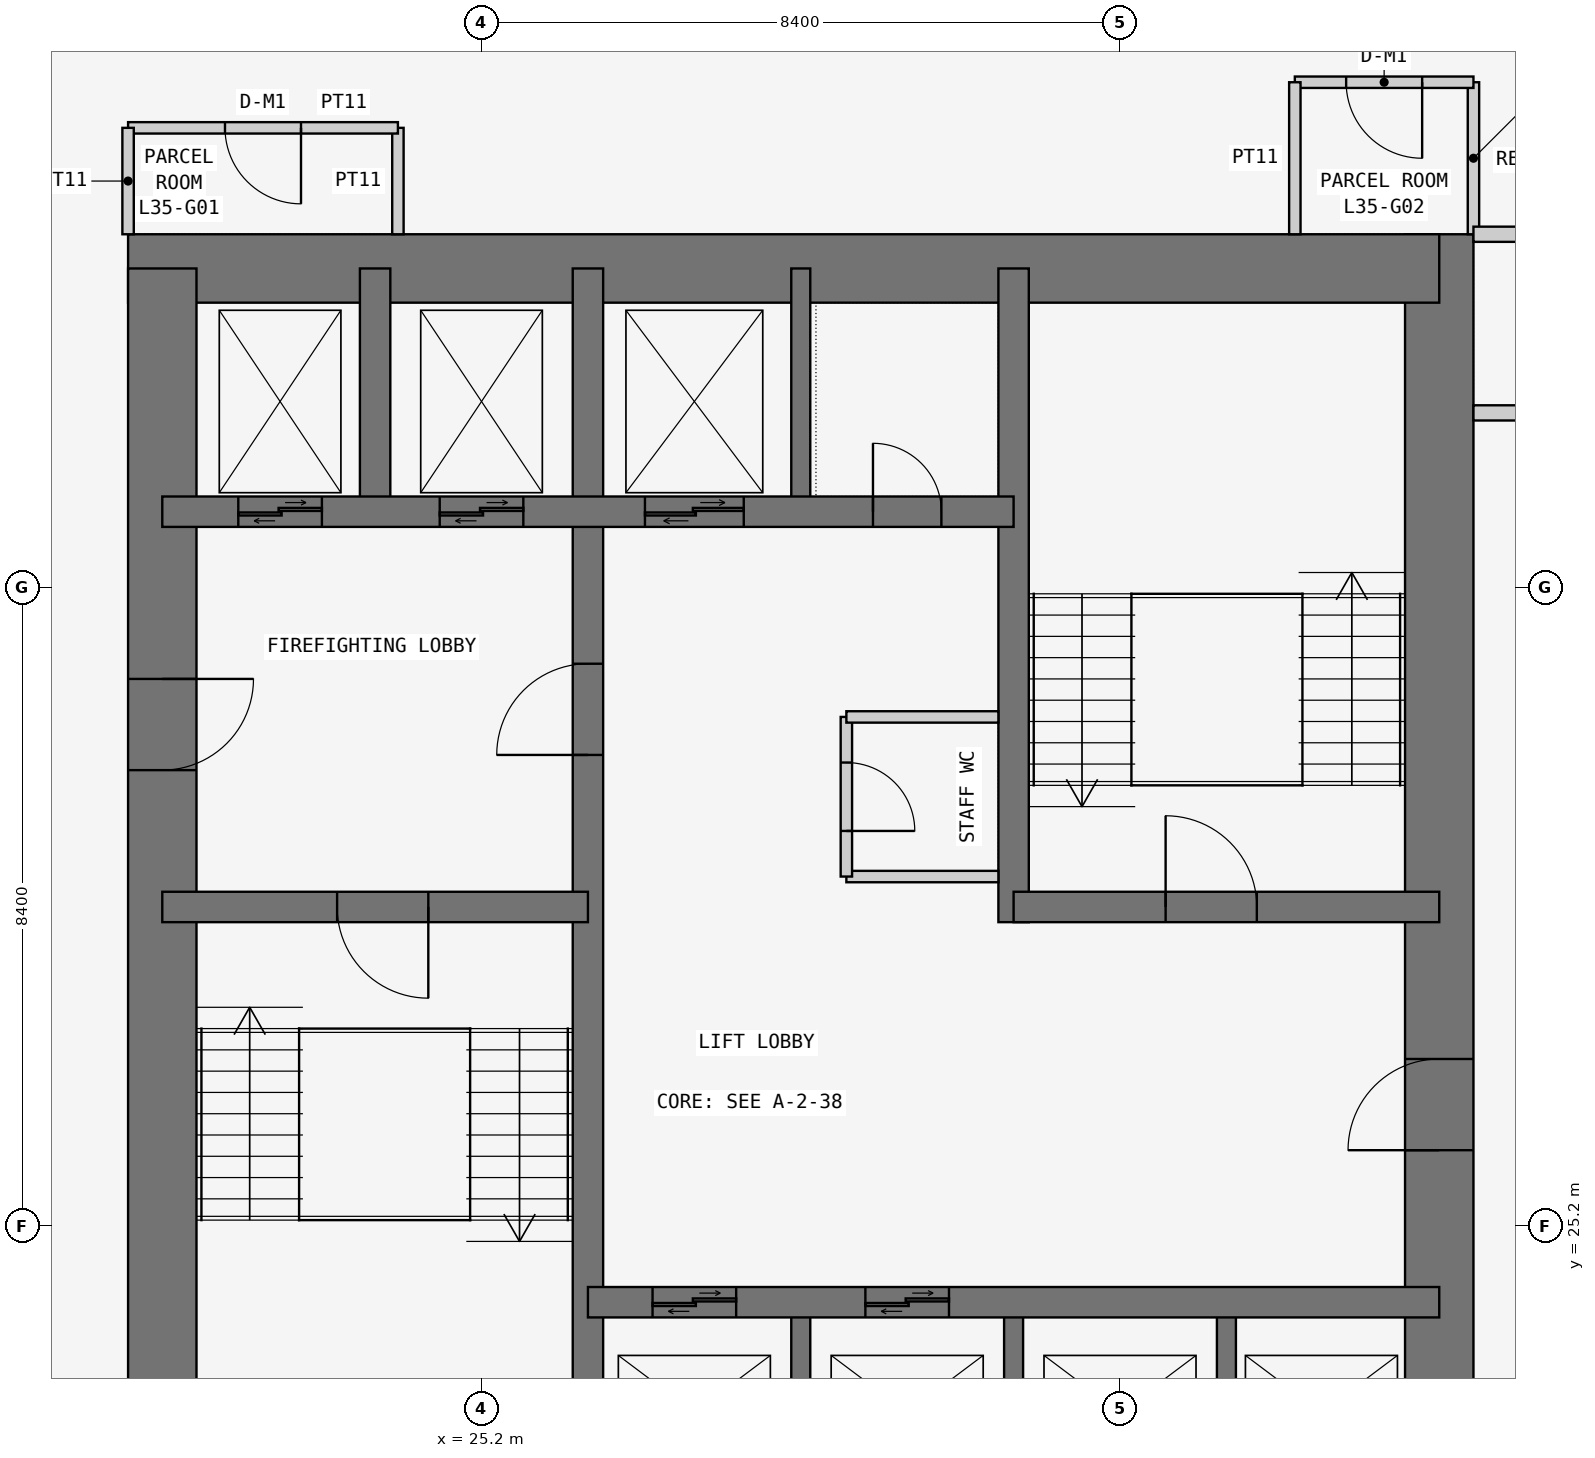
"""IFC4 building model, lengths in metres.
Left out: names, types, materials, properties, quantities, classifications, styles, units other than length and angle.
Written with IfcOpenShell. Run it as: python <this file> out.ifc"""

import sys

from ifc_helpers import new_model, si_unit, direction, frame, frame_2d, origin, place, context, subcontext, project, spatial, rectangle, extrude, element, fill, save


model = new_model("IFC4")
c1 = context("Model", 3, precision=1e-05, world=origin(), true_north=direction((0.0, 1.0)))
c2 = subcontext(c1, "Body", "Model", "MODEL_VIEW")
j1 = project(units=[si_unit("LENGTHUNIT", "METRE"), si_unit("PLANEANGLEUNIT", "RADIAN")], contexts=[c1])
p1 = place(None, origin())
s1 = spatial("IfcSite", under=j1, at=p1, CompositionType="ELEMENT")
p2 = place(p1, origin())
s2 = spatial("IfcBuilding", under=s1, at=p2, CompositionType="ELEMENT")
p3 = place(p2, frame((0.0, 0.0, 137.7)))
s3 = spatial("IfcBuildingStorey", under=s2, at=p3, CompositionType="ELEMENT", Elevation=137.7)
p4 = place(p3, frame((37.8, 21.0, 0.0), z_axis=(0.0, 0.0, 1.0), x_axis=(0.0, 1.0, 0.0)))
e1 = element("IfcWall", 1, at=p4, inside=s3, PredefinedType="SHEAR", context=c2, shape_type="SweptSolid", body=[
    extrude(rectangle(XDim=17.25, YDim=0.9, at=frame_2d((8.625, 0.0))), origin(), (0.0, 0.0, 1.0), 3.6),
])
p5 = place(p4, frame((5.2, 0.0, 0.0)))
e2 = element("IfcOpeningElement", 2, at=p5, cuts=e1, PredefinedType="OPENING", context=c2, shape_type="SweptSolid", body=[
    extrude(rectangle(XDim=1.2, YDim=2.1, at=frame_2d((0.6, 1.05))), frame((0.0, 0.46, 0.0), z_axis=(0.0, -1.0, 0.0), x_axis=(1.0, 0.0, 0.0)), (0.0, 0.0, 1.0), 0.92),
])
p6 = place(p3, frame((37.8, 37.8, 0.0), z_axis=(0.0, 0.0, 1.0), x_axis=(-1.0, 0.0, 0.0)))
e3 = element("IfcWall", 3, at=p6, inside=s3, PredefinedType="SHEAR", context=c2, shape_type="SweptSolid", body=[
    extrude(rectangle(XDim=17.25, YDim=0.9, at=frame_2d((8.625, 0.0))), origin(), (0.0, 0.0, 1.0), 3.6),
])
p7 = place(p3, frame((21.0, 37.8, 0.0), z_axis=(0.0, 0.0, 1.0), x_axis=(0.0, -1.0, 0.0)))
e4 = element("IfcWall", 4, at=p7, inside=s3, PredefinedType="SHEAR", context=c2, shape_type="SweptSolid", body=[
    extrude(rectangle(XDim=17.25, YDim=0.9, at=frame_2d((8.625, 0.0))), origin(), (0.0, 0.0, 1.0), 3.6),
])
p8 = place(p7, frame((5.4, 0.0, 0.0)))
e5 = element("IfcOpeningElement", 5, at=p8, cuts=e4, PredefinedType="OPENING", context=c2, shape_type="SweptSolid", body=[
    extrude(rectangle(XDim=1.2, YDim=2.1, at=frame_2d((0.6, 1.05))), frame((0.0, 0.46, 0.0), z_axis=(0.0, -1.0, 0.0), x_axis=(1.0, 0.0, 0.0)), (0.0, 0.0, 1.0), 0.92),
])
p9 = place(p3, frame((26.6, 21.0, 0.0), z_axis=(0.0, 0.0, 1.0), x_axis=(0.0, 1.0, 0.0)))
e6 = element("IfcWall", 6, at=p9, inside=s3, PredefinedType="SHEAR", context=c2, shape_type="SweptSolid", body=[
    extrude(rectangle(XDim=16.8, YDim=0.4, at=frame_2d((8.4, 0.0))), origin(), (0.0, 0.0, 1.0), 3.6),
])
p10 = place(p9, frame((10.4, 0.0, 0.0)))
e7 = element("IfcOpeningElement", 7, at=p10, cuts=e6, PredefinedType="OPENING", context=c2, shape_type="SweptSolid", body=[
    extrude(rectangle(XDim=1.2, YDim=2.1, at=frame_2d((0.6, 1.05))), frame((0.0, 0.21, 0.0), z_axis=(0.0, -1.0, 0.0), x_axis=(1.0, 0.0, 0.0)), (0.0, 0.0, 1.0), 0.42),
])
p11 = place(p3, frame((21.0, 29.4, 0.0), z_axis=(0.0, 0.0, 1.0), x_axis=(1.0, 0.0, 0.0)))
e8 = element("IfcWall", 8, at=p11, inside=s3, PredefinedType="SHEAR", context=c2, shape_type="SweptSolid", body=[
    extrude(rectangle(XDim=5.6, YDim=0.4, at=frame_2d((2.8, 0.0))), origin(), (0.0, 0.0, 1.0), 3.6),
])
p12 = place(p11, frame((2.3, 0.0, 0.0)))
e9 = element("IfcOpeningElement", 9, at=p12, cuts=e8, PredefinedType="OPENING", context=c2, shape_type="SweptSolid", body=[
    extrude(rectangle(XDim=1.2, YDim=2.1, at=frame_2d((0.6, 1.05))), frame((0.0, 0.21, 0.0), z_axis=(0.0, -1.0, 0.0), x_axis=(1.0, 0.0, 0.0)), (0.0, 0.0, 1.0), 0.42),
])
p13 = place(p3, frame((21.0, 34.6, 0.0), z_axis=(0.0, 0.0, 1.0), x_axis=(1.0, 0.0, 0.0)))
e10 = element("IfcWall", 10, at=p13, inside=s3, PredefinedType="SHEAR", context=c2, shape_type="SweptSolid", body=[
    extrude(rectangle(XDim=11.2, YDim=0.4, at=frame_2d((5.6, 0.0))), origin(), (0.0, 0.0, 1.0), 3.6),
])
p14 = place(p13, frame((9.35, 0.0, 0.0)))
e11 = element("IfcOpeningElement", 11, at=p14, cuts=e10, PredefinedType="OPENING", context=c2, shape_type="SweptSolid", body=[
    extrude(rectangle(XDim=0.9, YDim=2.1, at=frame_2d((0.45, 1.05))), frame((0.0, 0.21, 0.0), z_axis=(0.0, -1.0, 0.0), x_axis=(1.0, 0.0, 0.0)), (0.0, 0.0, 1.0), 0.42),
])
p15 = place(p13, frame((1.0, 0.0, 0.0)))
e12 = element("IfcOpeningElement", 12, at=p15, cuts=e10, PredefinedType="OPENING", context=c2, shape_type="SweptSolid", body=[
    extrude(rectangle(XDim=1.1, YDim=2.1, at=frame_2d((0.55, 1.05))), frame((0.0, 0.21, 0.0), z_axis=(0.0, -1.0, 0.0), x_axis=(1.0, 0.0, 0.0)), (0.0, 0.0, 1.0), 0.42),
])
p16 = place(p13, frame((3.65, 0.0, 0.0)))
e13 = element("IfcOpeningElement", 13, at=p16, cuts=e10, PredefinedType="OPENING", context=c2, shape_type="SweptSolid", body=[
    extrude(rectangle(XDim=1.1, YDim=2.1, at=frame_2d((0.55, 1.05))), frame((0.0, 0.21, 0.0), z_axis=(0.0, -1.0, 0.0), x_axis=(1.0, 0.0, 0.0)), (0.0, 0.0, 1.0), 0.42),
])
p17 = place(p13, frame((6.35, 0.0, 0.0)))
e14 = element("IfcOpeningElement", 14, at=p17, cuts=e10, PredefinedType="OPENING", context=c2, shape_type="SweptSolid", body=[
    extrude(rectangle(XDim=1.3, YDim=2.1, at=frame_2d((0.65, 1.05))), frame((0.0, 0.21, 0.0), z_axis=(0.0, -1.0, 0.0), x_axis=(1.0, 0.0, 0.0)), (0.0, 0.0, 1.0), 0.42),
])
p18 = place(p3, frame((23.8, 34.6, 0.0), z_axis=(0.0, 0.0, 1.0), x_axis=(0.0, 1.0, 0.0)))
e15 = element("IfcWall", 15, at=p18, inside=s3, PredefinedType="SHEAR", context=c2, shape_type="SweptSolid", body=[
    extrude(rectangle(XDim=3.2, YDim=0.4, at=frame_2d((1.6, 0.0))), origin(), (0.0, 0.0, 1.0), 3.6),
])
p19 = place(p3, frame((26.6, 24.2, 0.0), z_axis=(0.0, 0.0, 1.0), x_axis=(1.0, 0.0, 0.0)))
e16 = element("IfcWall", 16, at=p19, inside=s3, PredefinedType="SHEAR", context=c2, shape_type="SweptSolid", body=[
    extrude(rectangle(XDim=11.2, YDim=0.4, at=frame_2d((5.6, 0.0))), origin(), (0.0, 0.0, 1.0), 3.6),
])
p20 = place(p19, frame((0.85, 0.0, 0.0)))
e17 = element("IfcOpeningElement", 17, at=p20, cuts=e16, PredefinedType="OPENING", context=c2, shape_type="SweptSolid", body=[
    extrude(rectangle(XDim=1.1, YDim=2.1, at=frame_2d((0.55, 1.05))), frame((0.0, 0.21, 0.0), z_axis=(0.0, -1.0, 0.0), x_axis=(1.0, 0.0, 0.0)), (0.0, 0.0, 1.0), 0.42),
])
p21 = place(p19, frame((3.65, 0.0, 0.0)))
e18 = element("IfcOpeningElement", 18, at=p21, cuts=e16, PredefinedType="OPENING", context=c2, shape_type="SweptSolid", body=[
    extrude(rectangle(XDim=1.1, YDim=2.1, at=frame_2d((0.55, 1.05))), frame((0.0, 0.21, 0.0), z_axis=(0.0, -1.0, 0.0), x_axis=(1.0, 0.0, 0.0)), (0.0, 0.0, 1.0), 0.42),
])
p22 = place(p3, frame((32.2, 29.2, 0.0), z_axis=(0.0, 0.0, 1.0), x_axis=(0.0, 1.0, 0.0)))
e19 = element("IfcWall", 19, at=p22, inside=s3, PredefinedType="SHEAR", context=c2, shape_type="SweptSolid", body=[
    extrude(rectangle(XDim=8.6, YDim=0.4, at=frame_2d((4.3, 0.0))), origin(), (0.0, 0.0, 1.0), 3.6),
])
p23 = place(p3, frame((32.2, 29.4, 0.0), z_axis=(0.0, 0.0, 1.0), x_axis=(1.0, 0.0, 0.0)))
e20 = element("IfcWall", 20, at=p23, inside=s3, PredefinedType="SHEAR", context=c2, shape_type="SweptSolid", body=[
    extrude(rectangle(XDim=5.6, YDim=0.4, at=frame_2d((2.8, 0.0))), origin(), (0.0, 0.0, 1.0), 3.6),
])
p24 = place(p23, frame((2.0, 0.0, 0.0)))
e21 = element("IfcOpeningElement", 21, at=p24, cuts=e20, PredefinedType="OPENING", context=c2, shape_type="SweptSolid", body=[
    extrude(rectangle(XDim=1.2, YDim=2.1, at=frame_2d((0.6, 1.05))), frame((0.0, 0.21, 0.0), z_axis=(0.0, -1.0, 0.0), x_axis=(1.0, 0.0, 0.0)), (0.0, 0.0, 1.0), 0.42),
])
for number, where, z_axis, x_axis in (
    (22, (29.4, 21.0, 0.0), (0.0, 0.0, 1.0), (0.0, 1.0, 0.0)),
    (23, (32.2, 21.0, 0.0), (0.0, 0.0, 1.0), (0.0, 1.0, 0.0)),
    (24, (35.0, 21.0, 0.0), (0.0, 0.0, 1.0), (0.0, 1.0, 0.0)),
    (25, (29.4, 34.6, 0.0), (0.0, 0.0, 1.0), (0.0, 1.0, 0.0)),
):
    element("IfcWall", number, at=place(p3, frame(where, z_axis=z_axis, x_axis=x_axis)), inside=s3, PredefinedType="SHEAR", context=c2, shape_type="SweptSolid", body=[
        extrude(rectangle(XDim=3.2, YDim=0.25, at=frame_2d((1.6, 0.0))), origin(), (0.0, 0.0, 1.0), 3.6),
    ])
p25 = place(p3, frame((24.1, 38.25, 0.0), z_axis=(0.0, 0.0, 1.0), x_axis=(0.0, 1.0, 0.0)))
e26 = element("IfcWall", 26, at=p25, inside=s3, PredefinedType="PARTITIONING", context=c2, shape_type="SweptSolid", body=[
    extrude(rectangle(XDim=1.4, YDim=0.15, at=frame_2d((0.7, 0.0))), origin(), (0.0, 0.0, 1.0), 3.45),
])
p26 = place(p3, frame((24.1, 39.65, 0.0), z_axis=(0.0, 0.0, 1.0), x_axis=(-1.0, 0.0, 0.0)))
e27 = element("IfcWall", 27, at=p26, inside=s3, PredefinedType="PARTITIONING", context=c2, shape_type="SweptSolid", body=[
    extrude(rectangle(XDim=3.55, YDim=0.15, at=frame_2d((1.775, 0.0))), origin(), (0.0, 0.0, 1.0), 3.45),
])
p27 = place(p26, frame((1.275, 0.0, 0.0)))
e28 = element("IfcOpeningElement", 28, at=p27, cuts=e27, PredefinedType="OPENING", context=c2, shape_type="SweptSolid", body=[
    extrude(rectangle(XDim=1.0, YDim=2.1, at=frame_2d((0.5, 1.05))), frame((0.0, 0.085, 0.0), z_axis=(0.0, -1.0, 0.0), x_axis=(1.0, 0.0, 0.0)), (0.0, 0.0, 1.0), 0.17),
])
p28 = place(p3, frame((20.55, 39.65, 0.0), z_axis=(0.0, 0.0, 1.0), x_axis=(0.0, -1.0, 0.0)))
e29 = element("IfcWall", 29, at=p28, inside=s3, PredefinedType="PARTITIONING", context=c2, shape_type="SweptSolid", body=[
    extrude(rectangle(XDim=1.4, YDim=0.15, at=frame_2d((0.7, 0.0))), origin(), (0.0, 0.0, 1.0), 3.45),
])
p29 = place(p3, frame((38.25, 38.25, 0.0), z_axis=(0.0, 0.0, 1.0), x_axis=(0.0, 1.0, 0.0)))
e30 = element("IfcWall", 30, at=p29, inside=s3, PredefinedType="PARTITIONING", context=c2, shape_type="SweptSolid", body=[
    extrude(rectangle(XDim=2.0, YDim=0.15, at=frame_2d((1.0, 0.0))), origin(), (0.0, 0.0, 1.0), 3.45),
])
p30 = place(p3, frame((38.25, 40.25, 0.0), z_axis=(0.0, 0.0, 1.0), x_axis=(-1.0, 0.0, 0.0)))
e31 = element("IfcWall", 31, at=p30, inside=s3, PredefinedType="PARTITIONING", context=c2, shape_type="SweptSolid", body=[
    extrude(rectangle(XDim=2.35, YDim=0.15, at=frame_2d((1.175, 0.0))), origin(), (0.0, 0.0, 1.0), 3.45),
])
p31 = place(p30, frame((0.675, 0.0, 0.0)))
e32 = element("IfcOpeningElement", 32, at=p31, cuts=e31, PredefinedType="OPENING", context=c2, shape_type="SweptSolid", body=[
    extrude(rectangle(XDim=1.0, YDim=2.1, at=frame_2d((0.5, 1.05))), frame((0.0, 0.085, 0.0), z_axis=(0.0, -1.0, 0.0), x_axis=(1.0, 0.0, 0.0)), (0.0, 0.0, 1.0), 0.17),
])
p32 = place(p3, frame((35.9, 40.25, 0.0), z_axis=(0.0, 0.0, 1.0), x_axis=(0.0, -1.0, 0.0)))
e33 = element("IfcWall", 33, at=p32, inside=s3, PredefinedType="PARTITIONING", context=c2, shape_type="SweptSolid", body=[
    extrude(rectangle(XDim=2.0, YDim=0.15, at=frame_2d((1.0, 0.0))), origin(), (0.0, 0.0, 1.0), 3.45),
])
for number, where, z_axis, x_axis in (
    (34, (38.25, 35.9, 0.0), (0.0, 0.0, 1.0), (1.0, 0.0, 0.0)),
    (35, (40.6, 38.25, 0.0), (0.0, 0.0, 1.0), (-1.0, 0.0, 0.0)),
):
    element("IfcWall", number, at=place(p3, frame(where, z_axis=z_axis, x_axis=x_axis)), inside=s3, PredefinedType="PARTITIONING", context=c2, shape_type="SweptSolid", body=[
        extrude(rectangle(XDim=2.35, YDim=0.2, at=frame_2d((1.175, 0.0))), origin(), (0.0, 0.0, 1.0), 3.45),
    ])
p33 = place(p3, frame((32.0, 29.8, 0.0), z_axis=(0.0, 0.0, 1.0), x_axis=(-1.0, 0.0, 0.0)))
e36 = element("IfcWall", 36, at=p33, inside=s3, PredefinedType="PARTITIONING", context=c2, shape_type="SweptSolid", body=[
    extrude(rectangle(XDim=2.0, YDim=0.15, at=frame_2d((1.0, 0.0))), origin(), (0.0, 0.0, 1.0), 3.45),
])
p34 = place(p3, frame((30.0, 29.8, 0.0), z_axis=(0.0, 0.0, 1.0), x_axis=(0.0, 1.0, 0.0)))
e37 = element("IfcWall", 37, at=p34, inside=s3, PredefinedType="PARTITIONING", context=c2, shape_type="SweptSolid", body=[
    extrude(rectangle(XDim=2.1, YDim=0.15, at=frame_2d((1.05, 0.0))), origin(), (0.0, 0.0, 1.0), 3.45),
])
p35 = place(p34, frame((0.6, 0.0, 0.0)))
e38 = element("IfcOpeningElement", 38, at=p35, cuts=e37, PredefinedType="OPENING", context=c2, shape_type="SweptSolid", body=[
    extrude(rectangle(XDim=0.9, YDim=2.1, at=frame_2d((0.45, 1.05))), frame((0.0, 0.085, 0.0), z_axis=(0.0, -1.0, 0.0), x_axis=(1.0, 0.0, 0.0)), (0.0, 0.0, 1.0), 0.17),
])
p36 = place(p3, frame((30.0, 31.9, 0.0), z_axis=(0.0, 0.0, 1.0), x_axis=(1.0, 0.0, 0.0)))
e39 = element("IfcWall", 39, at=p36, inside=s3, PredefinedType="PARTITIONING", context=c2, shape_type="SweptSolid", body=[
    extrude(rectangle(XDim=2.0, YDim=0.15, at=frame_2d((1.0, 0.0))), origin(), (0.0, 0.0, 1.0), 3.45),
])
p37 = place(p27, origin())
e40 = element("IfcDoor", 40, at=p37, inside=s3, OperationType="SINGLE_SWING_LEFT", PredefinedType="DOOR", context=c2, shape_type="SweptSolid", body=[
    extrude(rectangle(XDim=1.0, YDim=2.1, at=frame_2d((0.5, 1.05))), frame((0.0, 0.025, 0.0), z_axis=(0.0, -1.0, 0.0), x_axis=(1.0, 0.0, 0.0)), (0.0, 0.0, 1.0), 0.05),
])
fill(e28, e40)
p38 = place(p31, origin())
e41 = element("IfcDoor", 41, at=p38, inside=s3, OperationType="SINGLE_SWING_LEFT", PredefinedType="DOOR", context=c2, shape_type="SweptSolid", body=[
    extrude(rectangle(XDim=1.0, YDim=2.1, at=frame_2d((0.5, 1.05))), frame((0.0, 0.025, 0.0), z_axis=(0.0, -1.0, 0.0), x_axis=(1.0, 0.0, 0.0)), (0.0, 0.0, 1.0), 0.05),
])
fill(e32, e41)
p39 = place(p8, origin())
e42 = element("IfcDoor", 42, at=p39, inside=s3, OperationType="SINGLE_SWING_LEFT", PredefinedType="DOOR", context=c2, shape_type="SweptSolid", body=[
    extrude(rectangle(XDim=1.2, YDim=2.1, at=frame_2d((0.6, 1.05))), frame((0.0, 0.025, 0.0), z_axis=(0.0, -1.0, 0.0), x_axis=(1.0, 0.0, 0.0)), (0.0, 0.0, 1.0), 0.05),
])
fill(e5, e42)
p40 = place(p12, frame((1.2, 0.0, 0.0), z_axis=(0.0, 0.0, 1.0), x_axis=(-1.0, 0.0, 0.0)))
e43 = element("IfcDoor", 43, at=p40, inside=s3, OperationType="SINGLE_SWING_LEFT", PredefinedType="DOOR", context=c2, shape_type="SweptSolid", body=[
    extrude(rectangle(XDim=1.2, YDim=2.1, at=frame_2d((0.6, 1.05))), frame((0.0, 0.025, 0.0), z_axis=(0.0, -1.0, 0.0), x_axis=(1.0, 0.0, 0.0)), (0.0, 0.0, 1.0), 0.05),
])
fill(e9, e43)
p41 = place(p10, origin())
e44 = element("IfcDoor", 44, at=p41, inside=s3, OperationType="SINGLE_SWING_LEFT", PredefinedType="DOOR", context=c2, shape_type="SweptSolid", body=[
    extrude(rectangle(XDim=1.2, YDim=2.1, at=frame_2d((0.6, 1.05))), frame((0.0, 0.025, 0.0), z_axis=(0.0, -1.0, 0.0), x_axis=(1.0, 0.0, 0.0)), (0.0, 0.0, 1.0), 0.05),
])
fill(e7, e44)
p42 = place(p5, origin())
e45 = element("IfcDoor", 45, at=p42, inside=s3, OperationType="SINGLE_SWING_LEFT", PredefinedType="DOOR", context=c2, shape_type="SweptSolid", body=[
    extrude(rectangle(XDim=1.2, YDim=2.1, at=frame_2d((0.6, 1.05))), frame((0.0, 0.025, 0.0), z_axis=(0.0, -1.0, 0.0), x_axis=(1.0, 0.0, 0.0)), (0.0, 0.0, 1.0), 0.05),
])
fill(e2, e45)
p43 = place(p24, origin())
e46 = element("IfcDoor", 46, at=p43, inside=s3, OperationType="SINGLE_SWING_LEFT", PredefinedType="DOOR", context=c2, shape_type="SweptSolid", body=[
    extrude(rectangle(XDim=1.2, YDim=2.1, at=frame_2d((0.6, 1.05))), frame((0.0, 0.025, 0.0), z_axis=(0.0, -1.0, 0.0), x_axis=(1.0, 0.0, 0.0)), (0.0, 0.0, 1.0), 0.05),
])
fill(e21, e46)
p44 = place(p14, origin())
e47 = element("IfcDoor", 47, at=p44, inside=s3, OperationType="SINGLE_SWING_LEFT", PredefinedType="DOOR", context=c2, shape_type="SweptSolid", body=[
    extrude(rectangle(XDim=0.9, YDim=2.1, at=frame_2d((0.45, 1.05))), frame((0.0, 0.025, 0.0), z_axis=(0.0, -1.0, 0.0), x_axis=(1.0, 0.0, 0.0)), (0.0, 0.0, 1.0), 0.05),
])
fill(e11, e47)
p45 = place(p35, frame((0.9, 0.0, 0.0), z_axis=(0.0, 0.0, 1.0), x_axis=(-1.0, 0.0, 0.0)))
e48 = element("IfcDoor", 48, at=p45, inside=s3, OperationType="SINGLE_SWING_RIGHT", PredefinedType="DOOR", context=c2, shape_type="SweptSolid", body=[
    extrude(rectangle(XDim=0.9, YDim=2.1, at=frame_2d((0.45, 1.05))), frame((0.0, 0.025, 0.0), z_axis=(0.0, -1.0, 0.0), x_axis=(1.0, 0.0, 0.0)), (0.0, 0.0, 1.0), 0.05),
])
fill(e38, e48)
p46 = place(p20, origin())
e49 = element("IfcDoor", 49, at=p46, inside=s3, OperationType="DOUBLE_DOOR_SLIDING", PredefinedType="DOOR", context=c2, shape_type="SweptSolid", body=[
    extrude(rectangle(XDim=1.1, YDim=2.1, at=frame_2d((0.55, 1.05))), frame((0.0, 0.025, 0.0), z_axis=(0.0, -1.0, 0.0), x_axis=(1.0, 0.0, 0.0)), (0.0, 0.0, 1.0), 0.05),
])
fill(e17, e49)
p47 = place(p21, origin())
e50 = element("IfcDoor", 50, at=p47, inside=s3, OperationType="DOUBLE_DOOR_SLIDING", PredefinedType="DOOR", context=c2, shape_type="SweptSolid", body=[
    extrude(rectangle(XDim=1.1, YDim=2.1, at=frame_2d((0.55, 1.05))), frame((0.0, 0.025, 0.0), z_axis=(0.0, -1.0, 0.0), x_axis=(1.0, 0.0, 0.0)), (0.0, 0.0, 1.0), 0.05),
])
fill(e18, e50)
p48 = place(p15, origin())
e51 = element("IfcDoor", 51, at=p48, inside=s3, OperationType="DOUBLE_DOOR_SLIDING", PredefinedType="DOOR", context=c2, shape_type="SweptSolid", body=[
    extrude(rectangle(XDim=1.1, YDim=2.1, at=frame_2d((0.55, 1.05))), frame((0.0, 0.025, 0.0), z_axis=(0.0, -1.0, 0.0), x_axis=(1.0, 0.0, 0.0)), (0.0, 0.0, 1.0), 0.05),
])
fill(e12, e51)
p49 = place(p16, origin())
e52 = element("IfcDoor", 52, at=p49, inside=s3, OperationType="DOUBLE_DOOR_SLIDING", PredefinedType="DOOR", context=c2, shape_type="SweptSolid", body=[
    extrude(rectangle(XDim=1.1, YDim=2.1, at=frame_2d((0.55, 1.05))), frame((0.0, 0.025, 0.0), z_axis=(0.0, -1.0, 0.0), x_axis=(1.0, 0.0, 0.0)), (0.0, 0.0, 1.0), 0.05),
])
fill(e13, e52)
p50 = place(p17, origin())
e53 = element("IfcDoor", 53, at=p50, inside=s3, OperationType="DOUBLE_DOOR_SLIDING", PredefinedType="DOOR", context=c2, shape_type="SweptSolid", body=[
    extrude(rectangle(XDim=1.3, YDim=2.1, at=frame_2d((0.65, 1.05))), frame((0.0, 0.025, 0.0), z_axis=(0.0, -1.0, 0.0), x_axis=(1.0, 0.0, 0.0)), (0.0, 0.0, 1.0), 0.05),
])
fill(e14, e53)
save(model, sys.argv[1])
